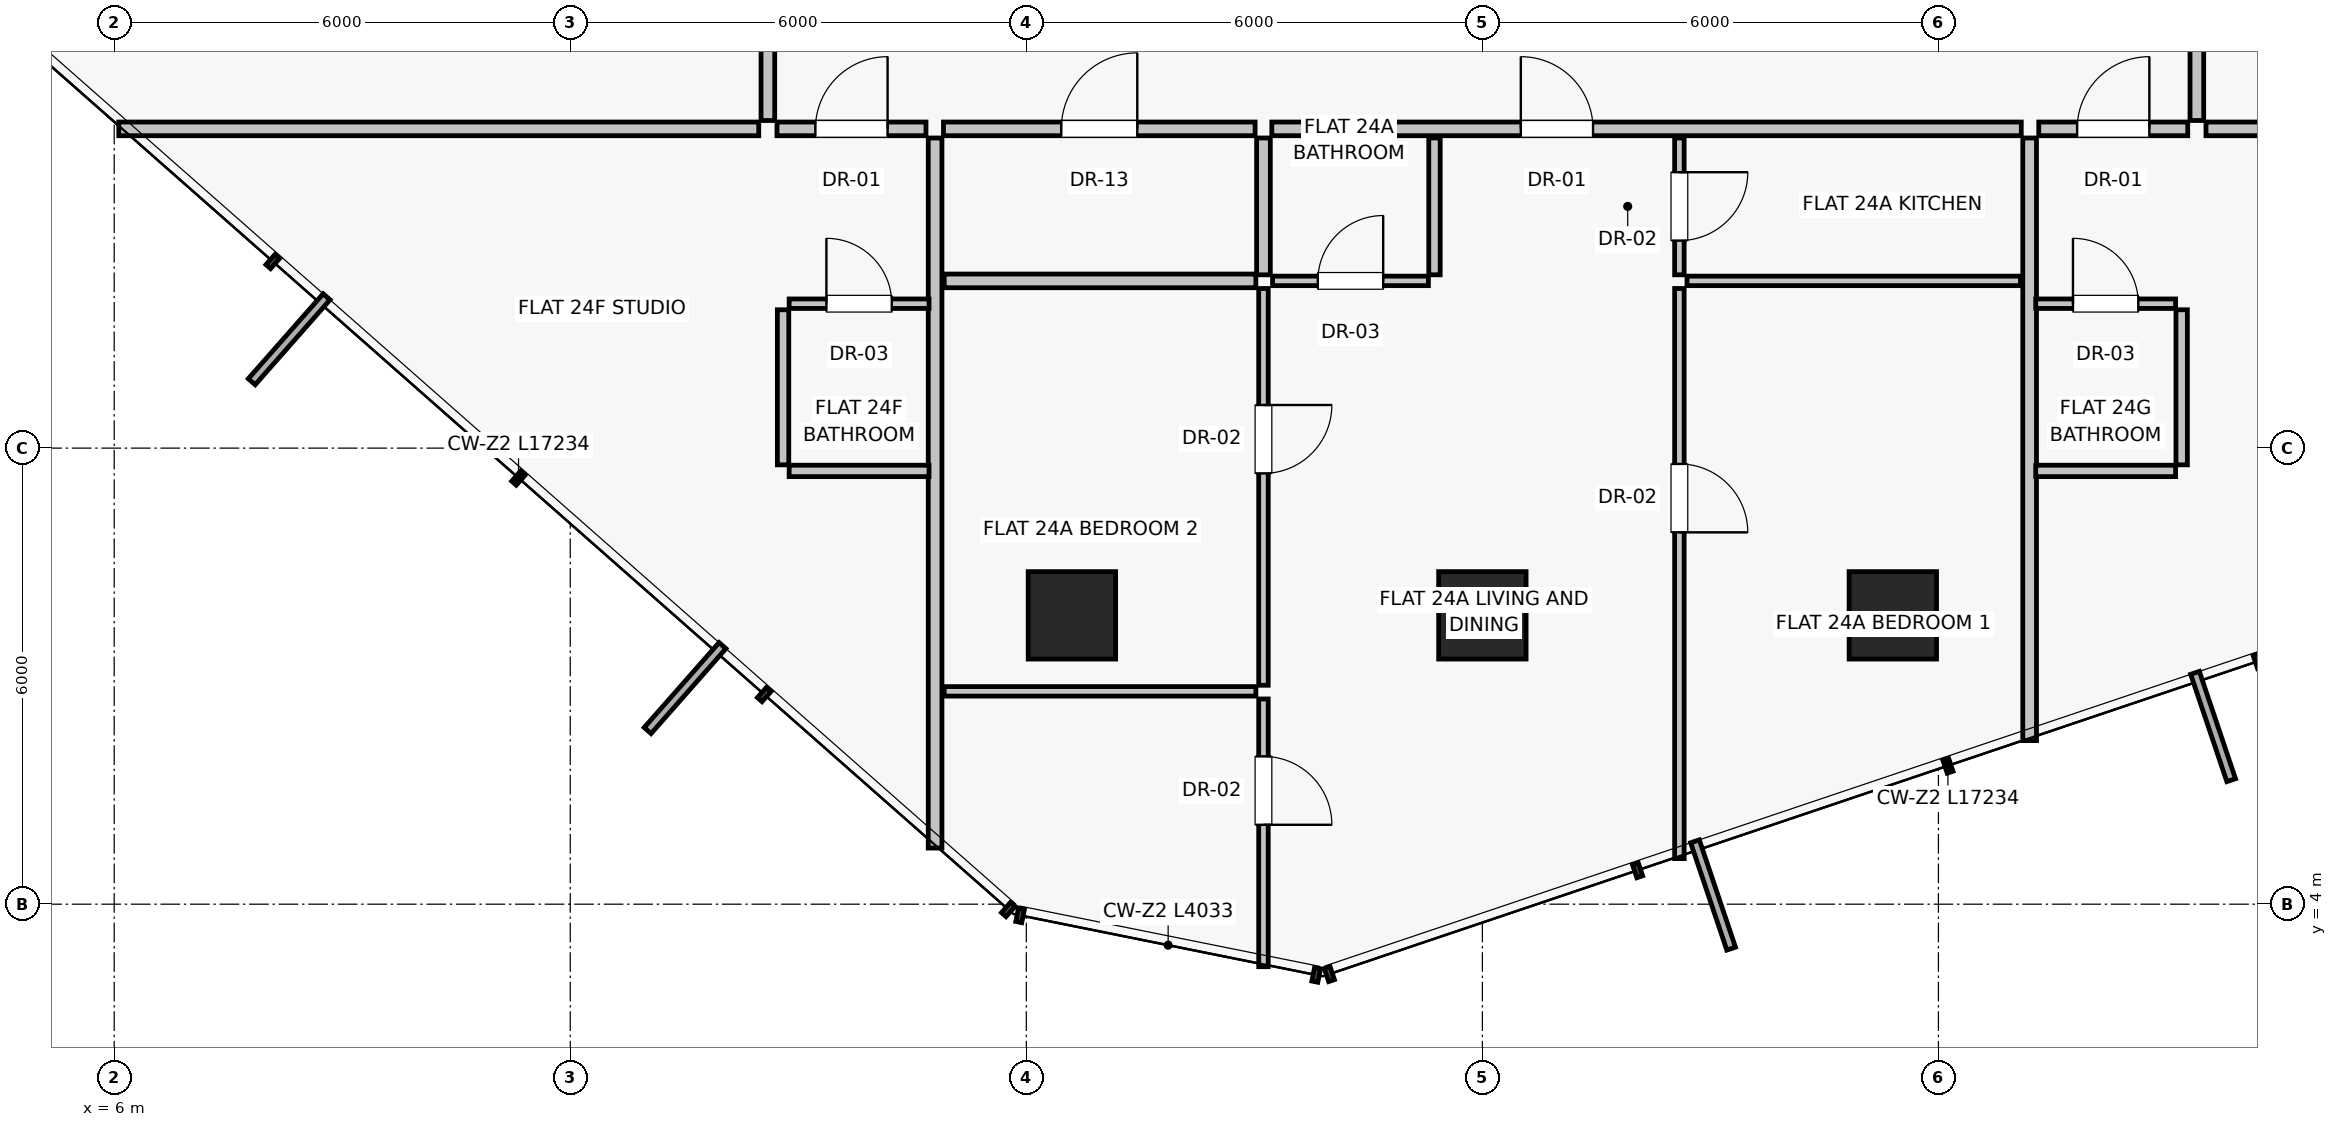
"""IFC4 building model, lengths in metres.
Left out: names, types, materials, properties, quantities, classifications, styles, units other than length and angle.
Written with IfcOpenShell. Run it as: python <this file> out.ifc"""

import sys

from ifc_helpers import new_model, si_unit, direction, frame, frame_2d, origin, origin_2d, place, context, subcontext, project, spatial, rectangle, extrude, source, transform, mapped, element, fill, save


model = new_model("IFC4")
c1 = context("Model", 3, precision=1e-05, world=origin(), true_north=direction((0.0, 1.0)))
c2 = subcontext(c1, "Body", "Model", "MODEL_VIEW")
j1 = project(units=[si_unit("LENGTHUNIT", "METRE"), si_unit("PLANEANGLEUNIT", "RADIAN")], contexts=[c1])
p1 = place(None, origin())
s1 = spatial("IfcSite", under=j1, at=p1, CompositionType="ELEMENT")
p2 = place(p1, origin())
s2 = spatial("IfcBuilding", under=s1, at=p2, CompositionType="ELEMENT")
p3 = place(p2, frame((0.0, 0.0, 89.45)))
s3 = spatial("IfcBuildingStorey", under=s2, at=p3, CompositionType="ELEMENT", Elevation=89.45)
for number, where, z_axis, x_axis in (
    (1, (18.6, 7.8, 0.0), (0.0, 0.0, 1.0), (1.0, 0.0, 0.0)),
    (2, (24.0, 7.8, 0.0), (0.0, 0.0, 1.0), (1.0, 0.0, 0.0)),
    (3, (29.4, 7.8, 0.0), (0.0, 0.0, 1.0), (1.0, 0.0, 0.0)),
):
    element("IfcColumn", number, at=place(p3, frame(where, z_axis=z_axis, x_axis=x_axis)), inside=s3, PredefinedType="COLUMN", context=c2, shape_type="SweptSolid", body=[
        extrude(rectangle(XDim=1.15, YDim=1.15, at=origin_2d()), origin(), (0.0, 0.0, 1.0), 3.25),
    ])
p4 = place(p3, frame((16.8, 14.08, 0.0), z_axis=(0.0, 0.0, 1.0), x_axis=(0.0, -1.0, 0.0)))
e4 = element("IfcWall", 4, at=p4, inside=s3, PredefinedType="PARTITIONING", context=c2, shape_type="SweptSolid", body=[
    extrude(rectangle(XDim=9.342, YDim=0.18, at=frame_2d((4.671, 0.0))), origin(), (0.0, 0.0, 1.0), 3.0),
])
p5 = place(p3, frame((31.2, 14.08, 0.0), z_axis=(0.0, 0.0, 1.0), x_axis=(0.0, -1.0, 0.0)))
e5 = element("IfcWall", 5, at=p5, inside=s3, PredefinedType="PARTITIONING", context=c2, shape_type="SweptSolid", body=[
    extrude(rectangle(XDim=7.928, YDim=0.18, at=frame_2d((3.964, 0.0))), origin(), (0.0, 0.0, 1.0), 3.0),
])
p6 = place(p3, frame((16.91, 14.2, 0.0), z_axis=(0.0, 0.0, 1.0), x_axis=(1.0, 0.0, 0.0)))
e6 = element("IfcWall", 6, at=p6, inside=s3, PredefinedType="PARTITIONING", context=c2, shape_type="SweptSolid", body=[
    extrude(rectangle(XDim=4.1, YDim=0.18, at=frame_2d((2.05, 0.0))), origin(), (0.0, 0.0, 1.0), 3.0),
])
p7 = place(p6, frame((1.55, 0.0, 0.0)))
e7 = element("IfcOpeningElement", 7, at=p7, cuts=e6, PredefinedType="OPENING", context=c2, shape_type="SweptSolid", body=[
    extrude(rectangle(XDim=1.0, YDim=2.01, at=frame_2d((0.5, 1.005))), frame((0.0, 0.1, 0.0), z_axis=(0.0, -1.0, 0.0), x_axis=(1.0, 0.0, 0.0)), (0.0, 0.0, 1.0), 0.2),
])
p8 = place(p3, frame((21.23, 14.2, 0.0), z_axis=(0.0, 0.0, 1.0), x_axis=(1.0, 0.0, 0.0)))
e8 = element("IfcWall", 8, at=p8, inside=s3, PredefinedType="PARTITIONING", context=c2, shape_type="SweptSolid", body=[
    extrude(rectangle(XDim=9.86, YDim=0.18, at=frame_2d((4.93, 0.0))), origin(), (0.0, 0.0, 1.0), 3.0),
])
p9 = place(p8, frame((3.276, 0.0, 0.0)))
e9 = element("IfcOpeningElement", 9, at=p9, cuts=e8, PredefinedType="OPENING", context=c2, shape_type="SweptSolid", body=[
    extrude(rectangle(XDim=0.95, YDim=2.02, at=frame_2d((0.475, 1.01))), frame((0.0, 0.1, 0.0), z_axis=(0.0, -1.0, 0.0), x_axis=(1.0, 0.0, 0.0)), (0.0, 0.0, 1.0), 0.2),
])
p10 = place(p3, frame((16.92, 6.8, 0.0), z_axis=(0.0, 0.0, 1.0), x_axis=(1.0, 0.0, 0.0)))
e10 = element("IfcWall", 10, at=p10, inside=s3, PredefinedType="PARTITIONING", context=c2, shape_type="SweptSolid", body=[
    extrude(rectangle(XDim=4.1, YDim=0.125, at=frame_2d((2.05, 0.0))), origin(), (0.0, 0.0, 1.0), 3.0),
])
p11 = place(p3, frame((21.12, 6.7, 0.0), z_axis=(0.0, 0.0, 1.0), x_axis=(0.0, -1.0, 0.0)))
e11 = element("IfcWall", 11, at=p11, inside=s3, PredefinedType="PARTITIONING", context=c2, shape_type="SweptSolid", body=[
    extrude(rectangle(XDim=3.522, YDim=0.125, at=frame_2d((1.761, 0.0))), origin(), (0.0, 0.0, 1.0), 3.0),
])
p12 = place(p11, frame((0.756, 0.0, 0.0)))
e12 = element("IfcOpeningElement", 12, at=p12, cuts=e11, PredefinedType="OPENING", context=c2, shape_type="SweptSolid", body=[
    extrude(rectangle(XDim=0.9, YDim=2.01, at=frame_2d((0.45, 1.005))), frame((0.0, 0.073, 0.0), z_axis=(0.0, -1.0, 0.0), x_axis=(1.0, 0.0, 0.0)), (0.0, 0.0, 1.0), 0.145),
])
p13 = place(p3, frame((16.92, 12.2, 0.0), z_axis=(0.0, 0.0, 1.0), x_axis=(1.0, 0.0, 0.0)))
e13 = element("IfcWall", 13, at=p13, inside=s3, PredefinedType="PARTITIONING", context=c2, shape_type="SweptSolid", body=[
    extrude(rectangle(XDim=4.1, YDim=0.18, at=frame_2d((2.05, 0.0))), origin(), (0.0, 0.0, 1.0), 2.58),
])
p14 = place(p3, frame((21.12, 14.08, 0.0), z_axis=(0.0, 0.0, 1.0), x_axis=(0.0, -1.0, 0.0)))
e14 = element("IfcWall", 14, at=p14, inside=s3, PredefinedType="PARTITIONING", context=c2, shape_type="SweptSolid", body=[
    extrude(rectangle(XDim=1.8, YDim=0.18, at=frame_2d((0.9, 0.0))), origin(), (0.0, 0.0, 1.0), 3.0),
])
p15 = place(p3, frame((21.12, 12.1, 0.0), z_axis=(0.0, 0.0, 1.0), x_axis=(0.0, -1.0, 0.0)))
e15 = element("IfcWall", 15, at=p15, inside=s3, PredefinedType="PARTITIONING", context=c2, shape_type="SweptSolid", body=[
    extrude(rectangle(XDim=5.22, YDim=0.125, at=frame_2d((2.61, 0.0))), origin(), (0.0, 0.0, 1.0), 3.0),
])
p16 = place(p15, frame((1.533, 0.0, 0.0)))
e16 = element("IfcOpeningElement", 16, at=p16, cuts=e15, PredefinedType="OPENING", context=c2, shape_type="SweptSolid", body=[
    extrude(rectangle(XDim=0.9, YDim=2.01, at=frame_2d((0.45, 1.005))), frame((0.0, 0.073, 0.0), z_axis=(0.0, -1.0, 0.0), x_axis=(1.0, 0.0, 0.0)), (0.0, 0.0, 1.0), 0.145),
])
p17 = place(p3, frame((23.37, 14.08, 0.0), z_axis=(0.0, 0.0, 1.0), x_axis=(0.0, -1.0, 0.0)))
e17 = element("IfcWall", 17, at=p17, inside=s3, PredefinedType="PARTITIONING", context=c2, shape_type="SweptSolid", body=[
    extrude(rectangle(XDim=1.8, YDim=0.15, at=frame_2d((0.9, 0.0))), origin(), (0.0, 0.0, 1.0), 3.0),
])
p18 = place(p3, frame((21.24, 12.2, 0.0), z_axis=(0.0, 0.0, 1.0), x_axis=(1.0, 0.0, 0.0)))
e18 = element("IfcWall", 18, at=p18, inside=s3, PredefinedType="PARTITIONING", context=c2, shape_type="SweptSolid", body=[
    extrude(rectangle(XDim=2.05, YDim=0.125, at=frame_2d((1.025, 0.0))), origin(), (0.0, 0.0, 1.0), 2.58),
])
p19 = place(p18, frame((0.595, 0.0, 0.0)))
e19 = element("IfcOpeningElement", 19, at=p19, cuts=e18, PredefinedType="OPENING", context=c2, shape_type="SweptSolid", body=[
    extrude(rectangle(XDim=0.86, YDim=2.01, at=frame_2d((0.43, 1.005))), frame((0.0, 0.073, 0.0), z_axis=(0.0, -1.0, 0.0), x_axis=(1.0, 0.0, 0.0)), (0.0, 0.0, 1.0), 0.145),
])
p20 = place(p3, frame((26.592, 14.08, 0.0), z_axis=(0.0, 0.0, 1.0), x_axis=(0.0, -1.0, 0.0)))
e20 = element("IfcWall", 20, at=p20, inside=s3, PredefinedType="PARTITIONING", context=c2, shape_type="SweptSolid", body=[
    extrude(rectangle(XDim=1.8, YDim=0.125, at=frame_2d((0.9, 0.0))), origin(), (0.0, 0.0, 1.0), 3.0),
])
p21 = place(p20, frame((0.45, 0.0, 0.0)))
e21 = element("IfcOpeningElement", 21, at=p21, cuts=e20, PredefinedType="OPENING", context=c2, shape_type="SweptSolid", body=[
    extrude(rectangle(XDim=0.9, YDim=2.01, at=frame_2d((0.45, 1.005))), frame((0.0, 0.073, 0.0), z_axis=(0.0, -1.0, 0.0), x_axis=(1.0, 0.0, 0.0)), (0.0, 0.0, 1.0), 0.145),
])
p22 = place(p3, frame((26.692, 12.2, 0.0), z_axis=(0.0, 0.0, 1.0), x_axis=(1.0, 0.0, 0.0)))
e22 = element("IfcWall", 22, at=p22, inside=s3, PredefinedType="PARTITIONING", context=c2, shape_type="SweptSolid", body=[
    extrude(rectangle(XDim=4.388, YDim=0.125, at=frame_2d((2.194, 0.0))), origin(), (0.0, 0.0, 1.0), 2.58),
])
p23 = place(p3, frame((26.592, 12.1, 0.0), z_axis=(0.0, 0.0, 1.0), x_axis=(0.0, -1.0, 0.0)))
e23 = element("IfcWall", 23, at=p23, inside=s3, PredefinedType="PARTITIONING", context=c2, shape_type="SweptSolid", body=[
    extrude(rectangle(XDim=7.5, YDim=0.125, at=frame_2d((3.75, 0.0))), origin(), (0.0, 0.0, 1.0), 3.0),
])
p24 = place(p23, frame((2.308, 0.0, 0.0)))
e24 = element("IfcOpeningElement", 24, at=p24, cuts=e23, PredefinedType="OPENING", context=c2, shape_type="SweptSolid", body=[
    extrude(rectangle(XDim=0.9, YDim=2.01, at=frame_2d((0.45, 1.005))), frame((0.0, 0.073, 0.0), z_axis=(0.0, -1.0, 0.0), x_axis=(1.0, 0.0, 0.0)), (0.0, 0.0, 1.0), 0.145),
])
p25 = place(p3, frame((14.48, 14.2, 0.0), z_axis=(0.0, 0.0, 1.0), x_axis=(-1.0, 0.0, 0.0)))
e25 = element("IfcWall", 25, at=p25, inside=s3, PredefinedType="PARTITIONING", context=c2, shape_type="SweptSolid", body=[
    extrude(rectangle(XDim=8.42, YDim=0.18, at=frame_2d((4.21, 0.0))), origin(), (0.0, 0.0, 1.0), 3.0),
])
p26 = place(p3, frame((14.6, 14.31, 0.0), z_axis=(0.0, 0.0, 1.0), x_axis=(0.0, 1.0, 0.0)))
e26 = element("IfcWall", 26, at=p26, inside=s3, PredefinedType="PARTITIONING", context=c2, shape_type="SweptSolid", body=[
    extrude(rectangle(XDim=4.172, YDim=0.18, at=frame_2d((2.086, 0.0))), origin(), (0.0, 0.0, 1.0), 3.0),
])
p27 = place(p26, frame((1.586, 0.0, 0.0)))
e27 = element("IfcOpeningElement", 27, at=p27, cuts=e26, PredefinedType="OPENING", context=c2, shape_type="SweptSolid", body=[
    extrude(rectangle(XDim=1.0, YDim=2.01, at=frame_2d((0.5, 1.005))), frame((0.0, 0.1, 0.0), z_axis=(0.0, -1.0, 0.0), x_axis=(1.0, 0.0, 0.0)), (0.0, 0.0, 1.0), 0.2),
])
p28 = place(p3, frame((33.52, 14.2, 0.0), z_axis=(0.0, 0.0, 1.0), x_axis=(1.0, 0.0, 0.0)))
e28 = element("IfcWall", 28, at=p28, inside=s3, PredefinedType="PARTITIONING", context=c2, shape_type="SweptSolid", body=[
    extrude(rectangle(XDim=8.105, YDim=0.18, at=frame_2d((4.053, 0.0))), origin(), (0.0, 0.0, 1.0), 3.0),
])
p29 = place(p3, frame((33.4, 14.31, 0.0), z_axis=(0.0, 0.0, 1.0), x_axis=(0.0, 1.0, 0.0)))
e29 = element("IfcWall", 29, at=p29, inside=s3, PredefinedType="PARTITIONING", context=c2, shape_type="SweptSolid", body=[
    extrude(rectangle(XDim=6.332, YDim=0.18, at=frame_2d((3.166, 0.0))), origin(), (0.0, 0.0, 1.0), 3.0),
])
p30 = place(p29, frame((3.887, 0.0, 0.0)))
e30 = element("IfcOpeningElement", 30, at=p30, cuts=e29, PredefinedType="OPENING", context=c2, shape_type="SweptSolid", body=[
    extrude(rectangle(XDim=0.95, YDim=2.02, at=frame_2d((0.475, 1.01))), frame((0.0, 0.1, 0.0), z_axis=(0.0, -1.0, 0.0), x_axis=(1.0, 0.0, 0.0)), (0.0, 0.0, 1.0), 0.2),
])
p31 = place(p3, frame((14.72, 14.2, 0.0), z_axis=(0.0, 0.0, 1.0), x_axis=(1.0, 0.0, 0.0)))
e31 = element("IfcWall", 31, at=p31, inside=s3, PredefinedType="PARTITIONING", context=c2, shape_type="SweptSolid", body=[
    extrude(rectangle(XDim=1.96, YDim=0.18, at=frame_2d((0.98, 0.0))), origin(), (0.0, 0.0, 1.0), 3.0),
])
p32 = place(p31, frame((0.505, 0.0, 0.0)))
e32 = element("IfcOpeningElement", 32, at=p32, cuts=e31, PredefinedType="OPENING", context=c2, shape_type="SweptSolid", body=[
    extrude(rectangle(XDim=0.95, YDim=2.02, at=frame_2d((0.475, 1.01))), frame((0.0, 0.1, 0.0), z_axis=(0.0, -1.0, 0.0), x_axis=(1.0, 0.0, 0.0)), (0.0, 0.0, 1.0), 0.2),
])
p33 = place(p3, frame((14.88, 11.9, 0.0), z_axis=(0.0, 0.0, 1.0), x_axis=(1.0, 0.0, 0.0)))
e33 = element("IfcWall", 33, at=p33, inside=s3, PredefinedType="PARTITIONING", context=c2, shape_type="SweptSolid", body=[
    extrude(rectangle(XDim=1.84, YDim=0.125, at=frame_2d((0.92, 0.0))), origin(), (0.0, 0.0, 1.0), 3.0),
])
p34 = place(p33, frame((0.49, 0.0, 0.0)))
e34 = element("IfcOpeningElement", 34, at=p34, cuts=e33, PredefinedType="OPENING", context=c2, shape_type="SweptSolid", body=[
    extrude(rectangle(XDim=0.86, YDim=2.01, at=frame_2d((0.43, 1.005))), frame((0.0, 0.073, 0.0), z_axis=(0.0, -1.0, 0.0), x_axis=(1.0, 0.0, 0.0)), (0.0, 0.0, 1.0), 0.145),
])
p35 = place(p3, frame((14.88, 9.7, 0.0), z_axis=(0.0, 0.0, 1.0), x_axis=(1.0, 0.0, 0.0)))
e35 = element("IfcWall", 35, at=p35, inside=s3, PredefinedType="PARTITIONING", context=c2, shape_type="SweptSolid", body=[
    extrude(rectangle(XDim=1.84, YDim=0.15, at=frame_2d((0.92, 0.0))), origin(), (0.0, 0.0, 1.0), 3.0),
])
p36 = place(p3, frame((14.8, 9.78, 0.0), z_axis=(0.0, 0.0, 1.0), x_axis=(0.0, 1.0, 0.0)))
e36 = element("IfcWall", 36, at=p36, inside=s3, PredefinedType="PARTITIONING", context=c2, shape_type="SweptSolid", body=[
    extrude(rectangle(XDim=2.04, YDim=0.15, at=frame_2d((1.02, 0.0))), origin(), (0.0, 0.0, 1.0), 3.0),
])
p37 = place(p3, frame((31.32, 14.2, 0.0), z_axis=(0.0, 0.0, 1.0), x_axis=(1.0, 0.0, 0.0)))
e37 = element("IfcWall", 37, at=p37, inside=s3, PredefinedType="PARTITIONING", context=c2, shape_type="SweptSolid", body=[
    extrude(rectangle(XDim=1.96, YDim=0.18, at=frame_2d((0.98, 0.0))), origin(), (0.0, 0.0, 1.0), 3.0),
])
p38 = place(p37, frame((0.505, 0.0, 0.0)))
e38 = element("IfcOpeningElement", 38, at=p38, cuts=e37, PredefinedType="OPENING", context=c2, shape_type="SweptSolid", body=[
    extrude(rectangle(XDim=0.95, YDim=2.02, at=frame_2d((0.475, 1.01))), frame((0.0, 0.1, 0.0), z_axis=(0.0, -1.0, 0.0), x_axis=(1.0, 0.0, 0.0)), (0.0, 0.0, 1.0), 0.2),
])
p39 = place(p3, frame((31.28, 11.9, 0.0), z_axis=(0.0, 0.0, 1.0), x_axis=(1.0, 0.0, 0.0)))
e39 = element("IfcWall", 39, at=p39, inside=s3, PredefinedType="PARTITIONING", context=c2, shape_type="SweptSolid", body=[
    extrude(rectangle(XDim=1.84, YDim=0.125, at=frame_2d((0.92, 0.0))), origin(), (0.0, 0.0, 1.0), 3.0),
])
p40 = place(p39, frame((0.49, 0.0, 0.0)))
e40 = element("IfcOpeningElement", 40, at=p40, cuts=e39, PredefinedType="OPENING", context=c2, shape_type="SweptSolid", body=[
    extrude(rectangle(XDim=0.86, YDim=2.01, at=frame_2d((0.43, 1.005))), frame((0.0, 0.073, 0.0), z_axis=(0.0, -1.0, 0.0), x_axis=(1.0, 0.0, 0.0)), (0.0, 0.0, 1.0), 0.145),
])
p41 = place(p3, frame((31.28, 9.7, 0.0), z_axis=(0.0, 0.0, 1.0), x_axis=(1.0, 0.0, 0.0)))
e41 = element("IfcWall", 41, at=p41, inside=s3, PredefinedType="PARTITIONING", context=c2, shape_type="SweptSolid", body=[
    extrude(rectangle(XDim=1.84, YDim=0.15, at=frame_2d((0.92, 0.0))), origin(), (0.0, 0.0, 1.0), 3.0),
])
p42 = place(p3, frame((33.2, 9.78, 0.0), z_axis=(0.0, 0.0, 1.0), x_axis=(0.0, 1.0, 0.0)))
e42 = element("IfcWall", 42, at=p42, inside=s3, PredefinedType="PARTITIONING", context=c2, shape_type="SweptSolid", body=[
    extrude(rectangle(XDim=2.04, YDim=0.15, at=frame_2d((1.02, 0.0))), origin(), (0.0, 0.0, 1.0), 3.0),
])
m1 = source(origin(), c2, "Body", "SweptSolid", [
    extrude(rectangle(XDim=1.0, YDim=2.01, at=frame_2d((0.5, 1.005))), frame((0.0, 0.025, 0.0), z_axis=(0.0, -1.0, 0.0), x_axis=(1.0, 0.0, 0.0)), (0.0, 0.0, 1.0), 0.05),
])
p43 = place(p7, origin())
e43 = element("IfcDoor", 43, at=p43, inside=s3, OperationType="SINGLE_SWING_RIGHT", PredefinedType="DOOR", context=c2, shape_type="MappedRepresentation", body=[
    mapped(m1, transform((0.0, 0.0, 0.0), scale=1.0)),
])
fill(e7, e43)
m2 = source(origin(), c2, "Body", "SweptSolid", [
    extrude(rectangle(XDim=0.95, YDim=2.02, at=frame_2d((0.475, 1.01))), frame((0.0, 0.025, 0.0), z_axis=(0.0, -1.0, 0.0), x_axis=(1.0, 0.0, 0.0)), (0.0, 0.0, 1.0), 0.05),
])
p44 = place(p9, origin())
e44 = element("IfcDoor", 44, at=p44, inside=s3, OperationType="SINGLE_SWING_LEFT", PredefinedType="DOOR", context=c2, shape_type="MappedRepresentation", body=[
    mapped(m2, transform((0.0, 0.0, 0.0), scale=1.0)),
])
fill(e9, e44)
m3 = source(origin(), c2, "Body", "SweptSolid", [
    extrude(rectangle(XDim=0.9, YDim=2.01, at=frame_2d((0.45, 1.005))), frame((0.0, 0.025, 0.0), z_axis=(0.0, -1.0, 0.0), x_axis=(1.0, 0.0, 0.0)), (0.0, 0.0, 1.0), 0.05),
])
p45 = place(p12, origin())
e45 = element("IfcDoor", 45, at=p45, inside=s3, OperationType="SINGLE_SWING_RIGHT", PredefinedType="DOOR", context=c2, shape_type="MappedRepresentation", body=[
    mapped(m3, transform((0.0, 0.0, 0.0), scale=1.0)),
])
fill(e12, e45)
p46 = place(p16, origin())
e46 = element("IfcDoor", 46, at=p46, inside=s3, OperationType="SINGLE_SWING_LEFT", PredefinedType="DOOR", context=c2, shape_type="MappedRepresentation", body=[
    mapped(m3, transform((0.0, 0.0, 0.0), scale=1.0)),
])
fill(e16, e46)
m4 = source(origin(), c2, "Body", "SweptSolid", [
    extrude(rectangle(XDim=0.86, YDim=2.01, at=frame_2d((0.43, 1.005))), frame((0.0, 0.025, 0.0), z_axis=(0.0, -1.0, 0.0), x_axis=(1.0, 0.0, 0.0)), (0.0, 0.0, 1.0), 0.05),
])
p47 = place(p19, origin())
e47 = element("IfcDoor", 47, at=p47, inside=s3, OperationType="SINGLE_SWING_RIGHT", PredefinedType="DOOR", context=c2, shape_type="MappedRepresentation", body=[
    mapped(m4, transform((0.0, 0.0, 0.0), scale=1.0)),
])
fill(e19, e47)
p48 = place(p21, origin())
e48 = element("IfcDoor", 48, at=p48, inside=s3, OperationType="SINGLE_SWING_LEFT", PredefinedType="DOOR", context=c2, shape_type="MappedRepresentation", body=[
    mapped(m3, transform((0.0, 0.0, 0.0), scale=1.0)),
])
fill(e21, e48)
p49 = place(p24, origin())
e49 = element("IfcDoor", 49, at=p49, inside=s3, OperationType="SINGLE_SWING_RIGHT", PredefinedType="DOOR", context=c2, shape_type="MappedRepresentation", body=[
    mapped(m3, transform((0.0, 0.0, 0.0), scale=1.0)),
])
fill(e24, e49)
p50 = place(p32, origin())
e50 = element("IfcDoor", 50, at=p50, inside=s3, OperationType="SINGLE_SWING_RIGHT", PredefinedType="DOOR", context=c2, shape_type="MappedRepresentation", body=[
    mapped(m2, transform((0.0, 0.0, 0.0), scale=1.0)),
])
fill(e32, e50)
p51 = place(p34, origin())
e51 = element("IfcDoor", 51, at=p51, inside=s3, OperationType="SINGLE_SWING_LEFT", PredefinedType="DOOR", context=c2, shape_type="MappedRepresentation", body=[
    mapped(m4, transform((0.0, 0.0, 0.0), scale=1.0)),
])
fill(e34, e51)
p52 = place(p38, origin())
e52 = element("IfcDoor", 52, at=p52, inside=s3, OperationType="SINGLE_SWING_RIGHT", PredefinedType="DOOR", context=c2, shape_type="MappedRepresentation", body=[
    mapped(m2, transform((0.0, 0.0, 0.0), scale=1.0)),
])
fill(e38, e52)
p53 = place(p40, origin())
e53 = element("IfcDoor", 53, at=p53, inside=s3, OperationType="SINGLE_SWING_LEFT", PredefinedType="DOOR", context=c2, shape_type="MappedRepresentation", body=[
    mapped(m4, transform((0.0, 0.0, 0.0), scale=1.0)),
])
fill(e40, e53)
save(model, sys.argv[1])
